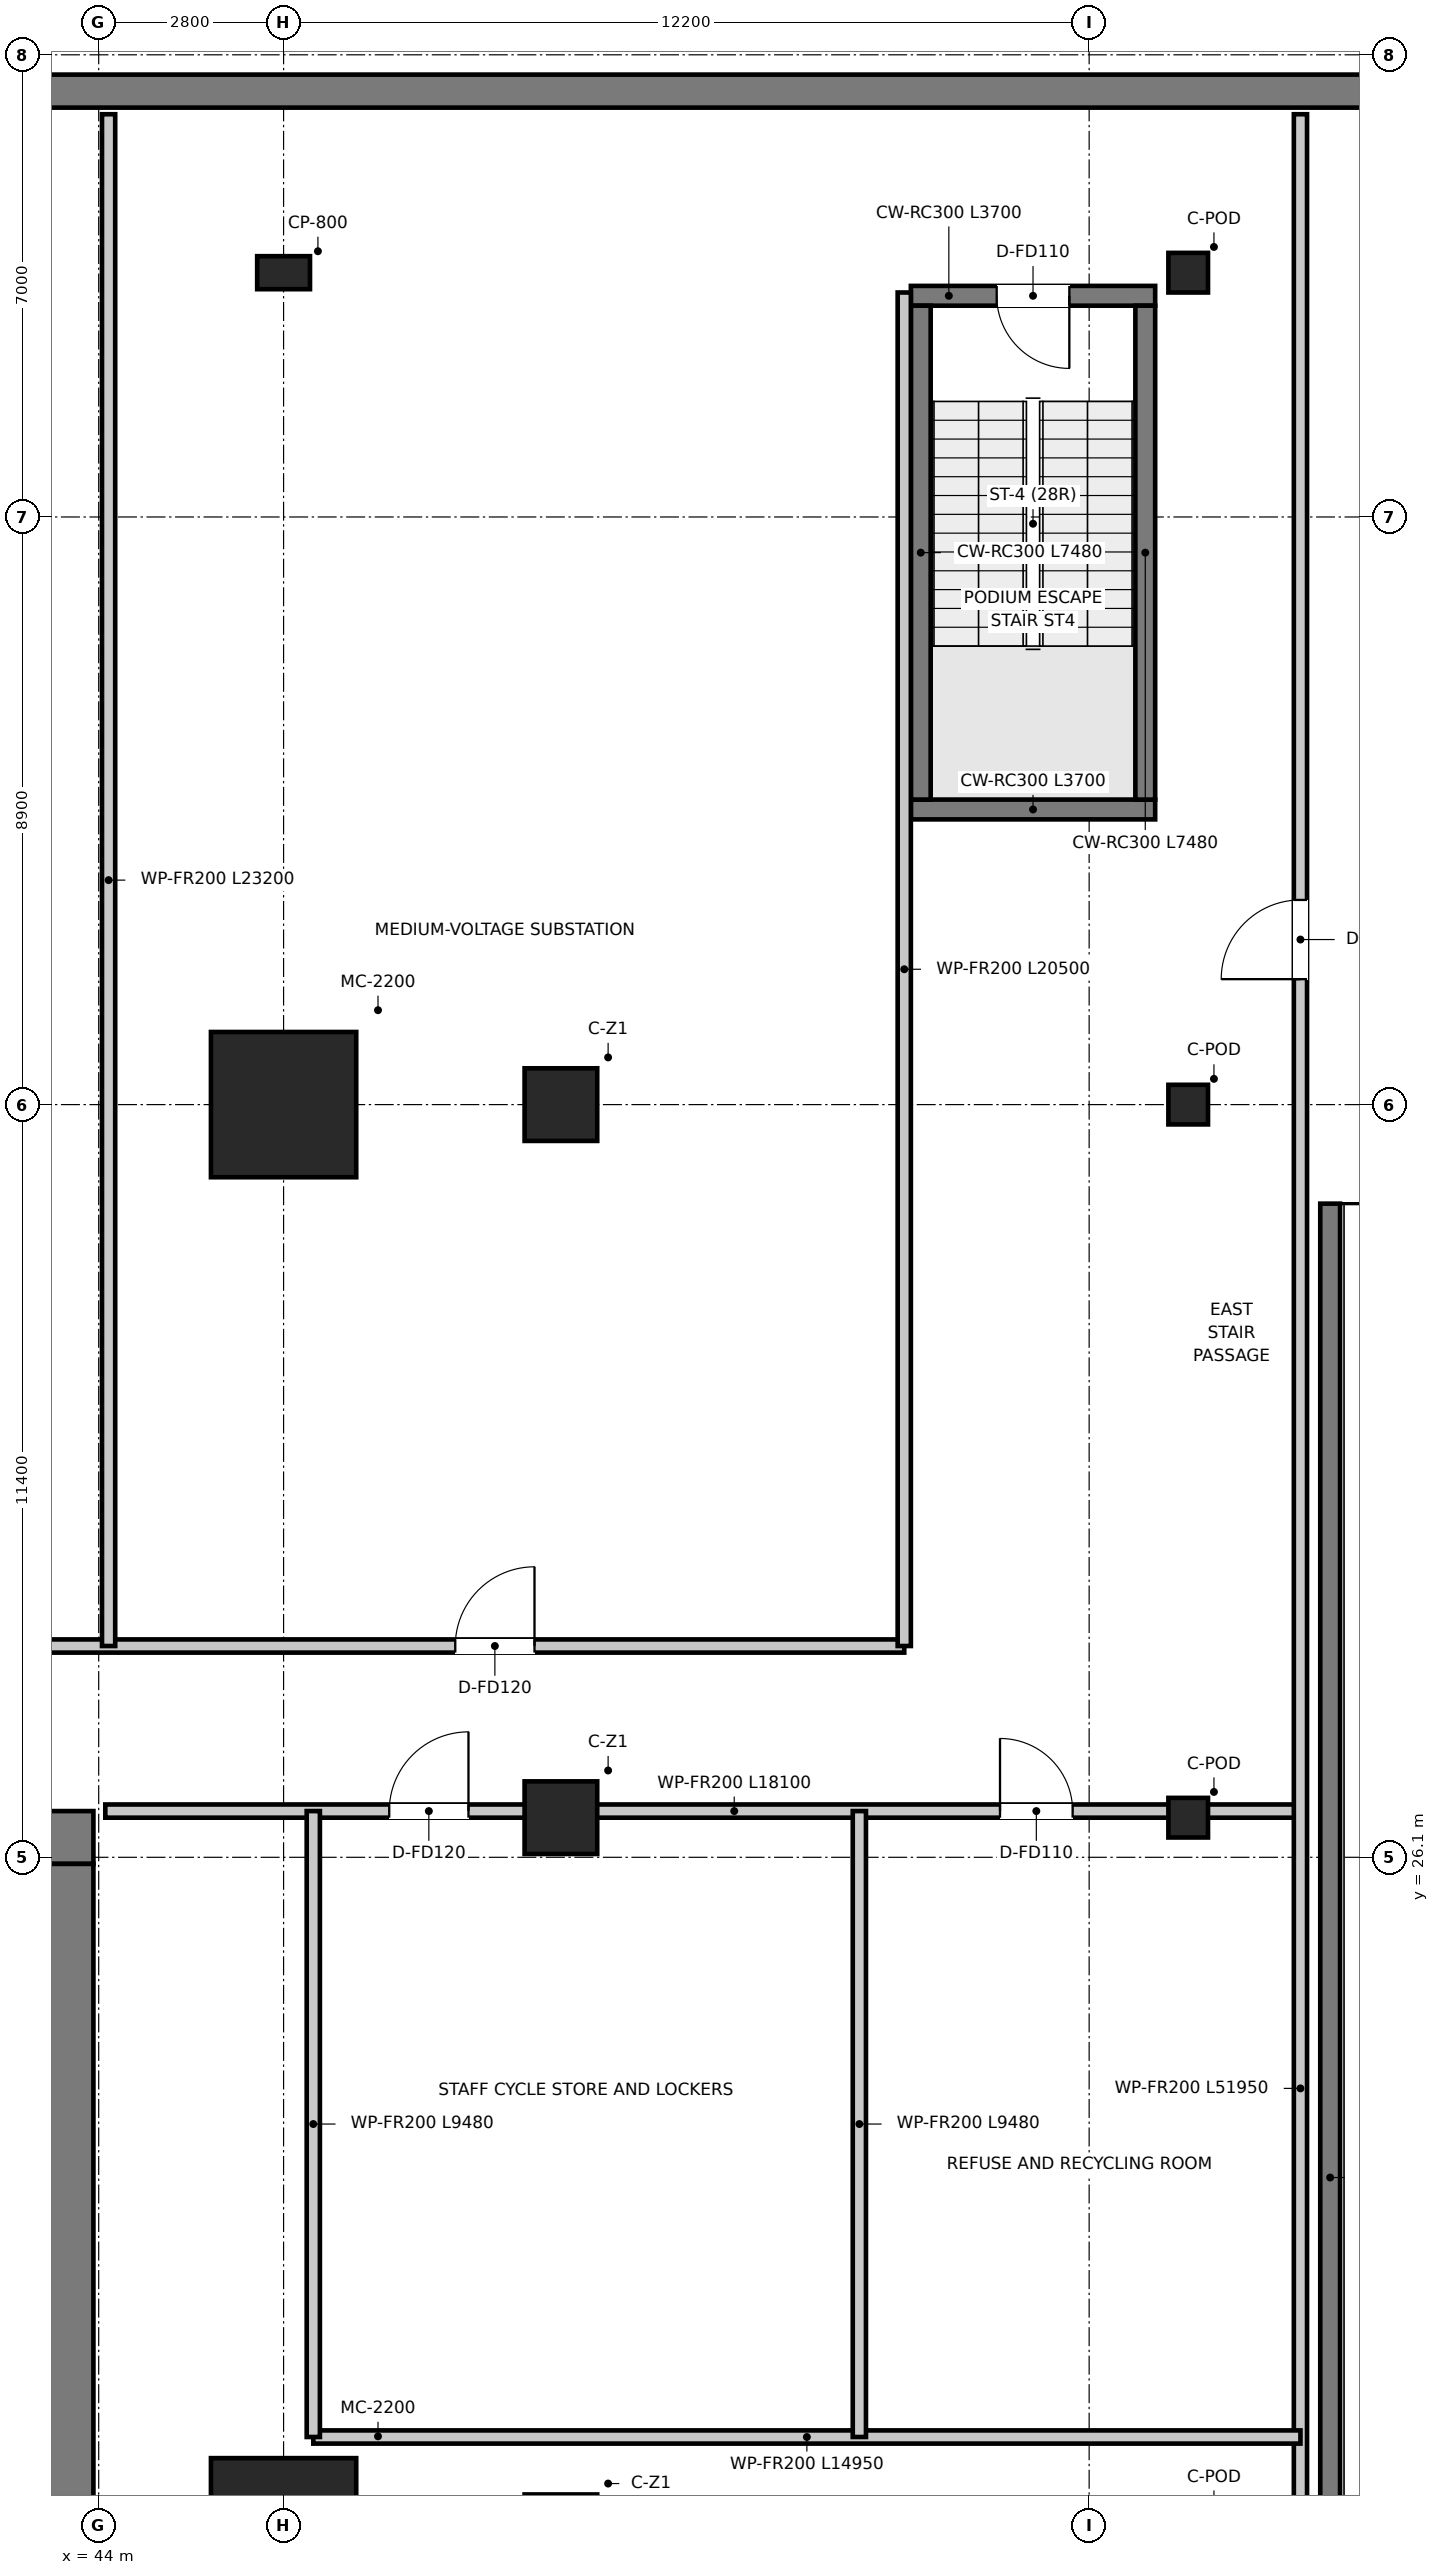
"""IFC4 building model, lengths in metres.
Left out: names, types, materials, properties, quantities, classifications, styles, units other than length and angle.
Written with IfcOpenShell. Run it as: python <this file> out.ifc"""

import sys

from ifc_helpers import new_model, si_unit, direction, frame, frame_2d, origin, origin_2d, place, context, subcontext, project, spatial, rectangle, extrude, source, transform, mapped, element, fill, save


model = new_model("IFC4")
c1 = context("Model", 3, precision=1e-05, world=origin(), true_north=direction((0.0, 1.0)))
c2 = subcontext(c1, "Body", "Model", "MODEL_VIEW")
j1 = project(units=[si_unit("LENGTHUNIT", "METRE"), si_unit("PLANEANGLEUNIT", "RADIAN")], contexts=[c1])
p1 = place(None, origin())
s1 = spatial("IfcSite", under=j1, at=p1, CompositionType="ELEMENT")
p2 = place(p1, origin())
s2 = spatial("IfcBuilding", under=s1, at=p2, CompositionType="ELEMENT")
p3 = place(p2, frame((0.0, 0.0, -4.8)))
s3 = spatial("IfcBuildingStorey", under=s2, at=p3, CompositionType="ELEMENT", Elevation=-4.8)
p4 = place(p3, frame((28.08, 26.4, 0.0), z_axis=(0.0, 0.0, 1.0), x_axis=(1.0, 0.0, 0.0)))
e1 = element("IfcWall", 1, at=p4, inside=s3, PredefinedType="SHEAR", context=c2, shape_type="SweptSolid", body=[
    extrude(rectangle(XDim=15.84, YDim=0.8, at=frame_2d((7.92, 0.0))), origin(), (0.0, 0.0, 1.0), 4.8),
])
p5 = place(p4, frame((7.22, 0.0, 0.0)))
e2 = element("IfcOpeningElement", 2, at=p5, cuts=e1, PredefinedType="OPENING", context=c2, shape_type="SweptSolid", body=[
    extrude(rectangle(XDim=1.4, YDim=2.2, at=frame_2d((0.7, 1.1))), frame((0.0, 0.41, 0.0), z_axis=(0.0, -1.0, 0.0), x_axis=(1.0, 0.0, 0.0)), (0.0, 0.0, 1.0), 0.82),
])
p6 = place(p4, frame((1.775, 0.0, 0.0)))
e3 = element("IfcOpeningElement", 3, at=p6, cuts=e1, PredefinedType="OPENING", context=c2, shape_type="SweptSolid", body=[
    extrude(rectangle(XDim=1.05, YDim=2.1, at=frame_2d((0.525, 1.05))), frame((0.0, 0.41, 0.0), z_axis=(0.0, -1.0, 0.0), x_axis=(1.0, 0.0, 0.0)), (0.0, 0.0, 1.0), 0.82),
])
p7 = place(p4, frame((13.015, 0.0, 0.0)))
e4 = element("IfcOpeningElement", 4, at=p7, cuts=e1, PredefinedType="OPENING", context=c2, shape_type="SweptSolid", body=[
    extrude(rectangle(XDim=1.05, YDim=2.1, at=frame_2d((0.525, 1.05))), frame((0.0, 0.41, 0.0), z_axis=(0.0, -1.0, 0.0), x_axis=(1.0, 0.0, 0.0)), (0.0, 0.0, 1.0), 0.82),
])
p8 = place(p3, frame((43.52, 11.3, 0.0), z_axis=(0.0, 0.0, 1.0), x_axis=(0.0, 1.0, 0.0)))
e5 = element("IfcWall", 5, at=p8, inside=s3, PredefinedType="SHEAR", context=c2, shape_type="SweptSolid", body=[
    extrude(rectangle(XDim=14.7, YDim=0.8, at=frame_2d((7.35, 0.0))), origin(), (0.0, 0.0, 1.0), 4.8),
])
p9 = place(p3, frame((56.3, 41.97, 0.0), z_axis=(0.0, 0.0, 1.0), x_axis=(1.0, 0.0, 0.0)))
e6 = element("IfcWall", 6, at=p9, inside=s3, PredefinedType="SHEAR", context=c2, shape_type="SweptSolid", body=[
    extrude(rectangle(XDim=3.7, YDim=0.3, at=frame_2d((1.85, 0.0))), origin(), (0.0, 0.0, 1.0), 4.8),
])
p10 = place(p3, frame((60.0, 49.75, 0.0), z_axis=(0.0, 0.0, 1.0), x_axis=(-1.0, 0.0, 0.0)))
e7 = element("IfcWall", 7, at=p10, inside=s3, PredefinedType="SHEAR", context=c2, shape_type="SweptSolid", body=[
    extrude(rectangle(XDim=3.7, YDim=0.3, at=frame_2d((1.85, 0.0))), origin(), (0.0, 0.0, 1.0), 4.8),
])
p11 = place(p10, frame((1.3, 0.0, 0.0)))
e8 = element("IfcOpeningElement", 8, at=p11, cuts=e7, PredefinedType="OPENING", context=c2, shape_type="SweptSolid", body=[
    extrude(rectangle(XDim=1.1, YDim=2.15, at=frame_2d((0.55, 1.075))), frame((0.0, 0.16, 0.0), z_axis=(0.0, -1.0, 0.0), x_axis=(1.0, 0.0, 0.0)), (0.0, 0.0, 1.0), 0.32),
])
for number, where, z_axis, x_axis in (
    (9, (56.45, 42.12, 0.0), (0.0, 0.0, 1.0), (0.0, 1.0, 0.0)),
    (10, (59.85, 42.12, 0.0), (0.0, 0.0, 1.0), (0.0, 1.0, 0.0)),
):
    element("IfcWall", number, at=place(p3, frame(where, z_axis=z_axis, x_axis=x_axis)), inside=s3, PredefinedType="SHEAR", context=c2, shape_type="SweptSolid", body=[
        extrude(rectangle(XDim=7.48, YDim=0.3, at=frame_2d((3.74, 0.0))), origin(), (0.0, 0.0, 1.0), 4.8),
    ])
p12 = place(p3, frame((0.0, 52.85, 0.0), z_axis=(0.0, 0.0, 1.0), x_axis=(1.0, 0.0, 0.0)))
e11 = element("IfcWall", 11, at=p12, inside=s3, PredefinedType="SOLIDWALL", context=c2, shape_type="SweptSolid", body=[
    extrude(rectangle(XDim=72.0, YDim=0.5, at=frame_2d((36.0, 0.0))), origin(), (0.0, 0.0, 1.0), 4.8),
])
p13 = place(p3, frame((62.65, 6.5, 0.0), z_axis=(0.0, 0.0, 1.0), x_axis=(0.0, 1.0, 0.0)))
e12 = element("IfcWall", 12, at=p13, inside=s3, PredefinedType="SHEAR", context=c2, shape_type="SweptSolid", body=[
    extrude(rectangle(XDim=29.5, YDim=0.3, at=frame_2d((14.75, 0.0))), origin(), (0.0, 0.0, 1.0), 4.45),
])
m1 = source(origin(), c2, "Body", "SweptSolid", [
    extrude(rectangle(XDim=2.2, YDim=2.2, at=origin_2d()), origin(), (0.0, 0.0, 1.0), 4.8),
])
for number, where, z_axis, x_axis in (
    (13, (46.8, 15.9, 0.0), (0.0, 0.0, 1.0), (1.0, 0.0, 0.0)),
    (14, (46.8, 37.5, 0.0), (0.0, 0.0, 1.0), (1.0, 0.0, 0.0)),
):
    element("IfcColumn", number, at=place(p3, frame(where, z_axis=z_axis, x_axis=x_axis)), inside=s3, PredefinedType="USERDEFINED", context=c2, shape_type="MappedRepresentation", body=[
        mapped(m1, transform((0.0, 0.0, 0.0), x_axis=(1.0, 0.0, 0.0), y_axis=(0.0, 1.0, 0.0), z_axis=(0.0, 0.0, 1.0), scale=1.0)),
    ])
m2 = source(origin(), c2, "Body", "SweptSolid", [
    extrude(rectangle(XDim=1.1, YDim=1.1, at=origin_2d()), origin(), (0.0, 0.0, 1.0), 4.8),
])
for number, where, z_axis, x_axis in (
    (15, (51.0, 37.5, 0.0), (0.0, 0.0, 1.0), (1.0, 0.0, 0.0)),
    (16, (51.0, 26.7, 0.0), (0.0, 0.0, 1.0), (1.0, 0.0, 0.0)),
):
    element("IfcColumn", number, at=place(p3, frame(where, z_axis=z_axis, x_axis=x_axis)), inside=s3, PredefinedType="COLUMN", context=c2, shape_type="MappedRepresentation", body=[
        mapped(m2, transform((0.0, 0.0, 0.0), x_axis=(1.0, 0.0, 0.0), y_axis=(0.0, 1.0, 0.0), z_axis=(0.0, 0.0, 1.0), scale=1.0)),
    ])
m3 = source(origin(), c2, "Body", "SweptSolid", [
    extrude(rectangle(XDim=0.6, YDim=0.6, at=origin_2d()), origin(), (0.0, 0.0, 1.0), 4.8),
])
for number, where, z_axis, x_axis in (
    (17, (60.5, 26.7, 0.0), (0.0, 0.0, 1.0), (1.0, 0.0, 0.0)),
    (18, (60.5, 37.5, 0.0), (0.0, 0.0, 1.0), (1.0, 0.0, 0.0)),
    (19, (60.5, 50.1, 0.0), (0.0, 0.0, 1.0), (1.0, 0.0, 0.0)),
):
    element("IfcColumn", number, at=place(p3, frame(where, z_axis=z_axis, x_axis=x_axis)), inside=s3, PredefinedType="COLUMN", context=c2, shape_type="MappedRepresentation", body=[
        mapped(m3, transform((0.0, 0.0, 0.0), x_axis=(1.0, 0.0, 0.0), y_axis=(0.0, 1.0, 0.0), z_axis=(0.0, 0.0, 1.0), scale=1.0)),
    ])
m4 = source(origin(), c2, "Body", "SweptSolid", [
    extrude(rectangle(XDim=0.8, YDim=0.5, at=origin_2d()), origin(), (0.0, 0.0, 1.0), 4.8),
])
p14 = place(p3, frame((46.8, 50.1, 0.0), z_axis=(0.0, 0.0, 1.0), x_axis=(1.0, 0.0, 0.0)))
e20 = element("IfcColumn", 20, at=p14, inside=s3, PredefinedType="PILASTER", context=c2, shape_type="MappedRepresentation", body=[
    mapped(m4, transform((0.0, 0.0, 0.0), x_axis=(1.0, 0.0, 0.0), y_axis=(0.0, 1.0, 0.0), z_axis=(0.0, 0.0, 1.0), scale=1.0)),
])
p15 = place(p3, frame((15.8, 29.3, 0.0), z_axis=(0.0, 0.0, 1.0), x_axis=(1.0, 0.0, 0.0)))
e21 = element("IfcWall", 21, at=p15, inside=s3, PredefinedType="PARTITIONING", context=c2, shape_type="SweptSolid", body=[
    extrude(rectangle(XDim=40.4, YDim=0.2, at=frame_2d((20.2, 0.0))), origin(), (0.0, 0.0, 1.0), 3.65),
])
p16 = place(p15, frame((5.1, 0.0, 0.0)))
e22 = element("IfcOpeningElement", 22, at=p16, cuts=e21, PredefinedType="OPENING", context=c2, shape_type="SweptSolid", body=[
    extrude(rectangle(XDim=1.2, YDim=2.15, at=frame_2d((0.6, 1.075))), frame((0.0, 0.11, 0.0), z_axis=(0.0, -1.0, 0.0), x_axis=(1.0, 0.0, 0.0)), (0.0, 0.0, 1.0), 0.22),
])
p17 = place(p15, frame((19.65, 0.0, 0.0)))
e23 = element("IfcOpeningElement", 23, at=p17, cuts=e21, PredefinedType="OPENING", context=c2, shape_type="SweptSolid", body=[
    extrude(rectangle(XDim=1.1, YDim=2.15, at=frame_2d((0.55, 1.075))), frame((0.0, 0.11, 0.0), z_axis=(0.0, -1.0, 0.0), x_axis=(1.0, 0.0, 0.0)), (0.0, 0.0, 1.0), 0.22),
])
p18 = place(p15, frame((33.6, 0.0, 0.0)))
e24 = element("IfcOpeningElement", 24, at=p18, cuts=e21, PredefinedType="OPENING", context=c2, shape_type="SweptSolid", body=[
    extrude(rectangle(XDim=1.2, YDim=2.15, at=frame_2d((0.6, 1.075))), frame((0.0, 0.11, 0.0), z_axis=(0.0, -1.0, 0.0), x_axis=(1.0, 0.0, 0.0)), (0.0, 0.0, 1.0), 0.22),
])
p19 = place(p3, frame((44.1, 26.8, 0.0), z_axis=(0.0, 0.0, 1.0), x_axis=(1.0, 0.0, 0.0)))
e25 = element("IfcWall", 25, at=p19, inside=s3, PredefinedType="PARTITIONING", context=c2, shape_type="SweptSolid", body=[
    extrude(rectangle(XDim=18.1, YDim=0.2, at=frame_2d((9.05, 0.0))), origin(), (0.0, 0.0, 1.0), 3.65),
])
p20 = place(p19, frame((4.3, 0.0, 0.0)))
e26 = element("IfcOpeningElement", 26, at=p20, cuts=e25, PredefinedType="OPENING", context=c2, shape_type="SweptSolid", body=[
    extrude(rectangle(XDim=1.2, YDim=2.15, at=frame_2d((0.6, 1.075))), frame((0.0, 0.11, 0.0), z_axis=(0.0, -1.0, 0.0), x_axis=(1.0, 0.0, 0.0)), (0.0, 0.0, 1.0), 0.22),
])
p21 = place(p19, frame((13.55, 0.0, 0.0)))
e27 = element("IfcOpeningElement", 27, at=p21, cuts=e25, PredefinedType="OPENING", context=c2, shape_type="SweptSolid", body=[
    extrude(rectangle(XDim=1.1, YDim=2.15, at=frame_2d((0.55, 1.075))), frame((0.0, 0.11, 0.0), z_axis=(0.0, -1.0, 0.0), x_axis=(1.0, 0.0, 0.0)), (0.0, 0.0, 1.0), 0.22),
])
p22 = place(p3, frame((56.2, 29.3, 0.0), z_axis=(0.0, 0.0, 1.0), x_axis=(0.0, 1.0, 0.0)))
e28 = element("IfcWall", 28, at=p22, inside=s3, PredefinedType="PARTITIONING", context=c2, shape_type="SweptSolid", body=[
    extrude(rectangle(XDim=20.5, YDim=0.2, at=frame_2d((10.25, 0.0))), origin(), (0.0, 0.0, 1.0), 3.81),
])
p23 = place(p3, frame((62.2, 0.55, 0.0), z_axis=(0.0, 0.0, 1.0), x_axis=(0.0, 1.0, 0.0)))
e29 = element("IfcWall", 29, at=p23, inside=s3, PredefinedType="PARTITIONING", context=c2, shape_type="SweptSolid", body=[
    extrude(rectangle(XDim=51.95, YDim=0.2, at=frame_2d((25.975, 0.0))), origin(), (0.0, 0.0, 1.0), 3.81),
])
p24 = place(p23, frame((2.05, 0.0, 0.0)))
e30 = element("IfcOpeningElement", 30, at=p24, cuts=e29, PredefinedType="OPENING", context=c2, shape_type="SweptSolid", body=[
    extrude(rectangle(XDim=3.2, YDim=3.6, at=frame_2d((1.6, 1.8))), frame((0.0, 0.11, 0.0), z_axis=(0.0, -1.0, 0.0), x_axis=(1.0, 0.0, 0.0)), (0.0, 0.0, 1.0), 0.22),
])
p25 = place(p23, frame((38.85, 0.0, 0.0)))
e31 = element("IfcOpeningElement", 31, at=p25, cuts=e29, PredefinedType="OPENING", context=c2, shape_type="SweptSolid", body=[
    extrude(rectangle(XDim=1.2, YDim=2.15, at=frame_2d((0.6, 1.075))), frame((0.0, 0.11, 0.0), z_axis=(0.0, -1.0, 0.0), x_axis=(1.0, 0.0, 0.0)), (0.0, 0.0, 1.0), 0.22),
])
p26 = place(p3, frame((44.15, 29.3, 0.0), z_axis=(0.0, 0.0, 1.0), x_axis=(0.0, 1.0, 0.0)))
e32 = element("IfcWall", 32, at=p26, inside=s3, PredefinedType="PARTITIONING", context=c2, shape_type="SweptSolid", body=[
    extrude(rectangle(XDim=23.2, YDim=0.2, at=frame_2d((11.6, 0.0))), origin(), (0.0, 0.0, 1.0), 3.65),
])
p27 = place(p3, frame((47.25, 17.32, 0.0), z_axis=(0.0, 0.0, 1.0), x_axis=(1.0, 0.0, 0.0)))
e33 = element("IfcWall", 33, at=p27, inside=s3, PredefinedType="PARTITIONING", context=c2, shape_type="SweptSolid", body=[
    extrude(rectangle(XDim=14.95, YDim=0.2, at=frame_2d((7.475, 0.0))), origin(), (0.0, 0.0, 1.0), 3.76),
])
p28 = place(p3, frame((47.25, 17.32, 0.0), z_axis=(0.0, 0.0, 1.0), x_axis=(0.0, 1.0, 0.0)))
e34 = element("IfcWall", 34, at=p28, inside=s3, PredefinedType="PARTITIONING", context=c2, shape_type="SweptSolid", body=[
    extrude(rectangle(XDim=9.48, YDim=0.2, at=frame_2d((4.74, 0.0))), origin(), (0.0, 0.0, 1.0), 4.45),
])
p29 = place(p3, frame((55.52, 17.32, 0.0), z_axis=(0.0, 0.0, 1.0), x_axis=(0.0, 1.0, 0.0)))
e35 = element("IfcWall", 35, at=p29, inside=s3, PredefinedType="PARTITIONING", context=c2, shape_type="SweptSolid", body=[
    extrude(rectangle(XDim=9.48, YDim=0.2, at=frame_2d((4.74, 0.0))), origin(), (0.0, 0.0, 1.0), 3.81),
])
p30 = place(p11, origin())
e36 = element("IfcDoor", 36, at=p30, inside=s3, OperationType="SINGLE_SWING_LEFT", PredefinedType="DOOR", context=c2, shape_type="SweptSolid", body=[
    extrude(rectangle(XDim=1.1, YDim=2.15, at=frame_2d((0.55, 1.075))), frame((0.0, 0.025, 0.0), z_axis=(0.0, -1.0, 0.0), x_axis=(1.0, 0.0, 0.0)), (0.0, 0.0, 1.0), 0.05),
])
fill(e8, e36)
p31 = place(p20, origin())
e37 = element("IfcDoor", 37, at=p31, inside=s3, OperationType="SINGLE_SWING_RIGHT", PredefinedType="DOOR", context=c2, shape_type="SweptSolid", body=[
    extrude(rectangle(XDim=1.2, YDim=2.15, at=frame_2d((0.6, 1.075))), frame((0.0, 0.025, 0.0), z_axis=(0.0, -1.0, 0.0), x_axis=(1.0, 0.0, 0.0)), (0.0, 0.0, 1.0), 0.05),
])
fill(e26, e37)
p32 = place(p21, origin())
e38 = element("IfcDoor", 38, at=p32, inside=s3, OperationType="SINGLE_SWING_LEFT", PredefinedType="DOOR", context=c2, shape_type="SweptSolid", body=[
    extrude(rectangle(XDim=1.1, YDim=2.15, at=frame_2d((0.55, 1.075))), frame((0.0, 0.025, 0.0), z_axis=(0.0, -1.0, 0.0), x_axis=(1.0, 0.0, 0.0)), (0.0, 0.0, 1.0), 0.05),
])
fill(e27, e38)
p33 = place(p25, origin())
e39 = element("IfcDoor", 39, at=p33, inside=s3, OperationType="SINGLE_SWING_LEFT", PredefinedType="DOOR", context=c2, shape_type="SweptSolid", body=[
    extrude(rectangle(XDim=1.2, YDim=2.15, at=frame_2d((0.6, 1.075))), frame((0.0, 0.025, 0.0), z_axis=(0.0, -1.0, 0.0), x_axis=(1.0, 0.0, 0.0)), (0.0, 0.0, 1.0), 0.05),
])
fill(e31, e39)
p34 = place(p18, origin())
e40 = element("IfcDoor", 40, at=p34, inside=s3, OperationType="SINGLE_SWING_RIGHT", PredefinedType="DOOR", context=c2, shape_type="SweptSolid", body=[
    extrude(rectangle(XDim=1.2, YDim=2.15, at=frame_2d((0.6, 1.075))), frame((0.0, 0.025, 0.0), z_axis=(0.0, -1.0, 0.0), x_axis=(1.0, 0.0, 0.0)), (0.0, 0.0, 1.0), 0.05),
])
fill(e24, e40)
save(model, sys.argv[1])
